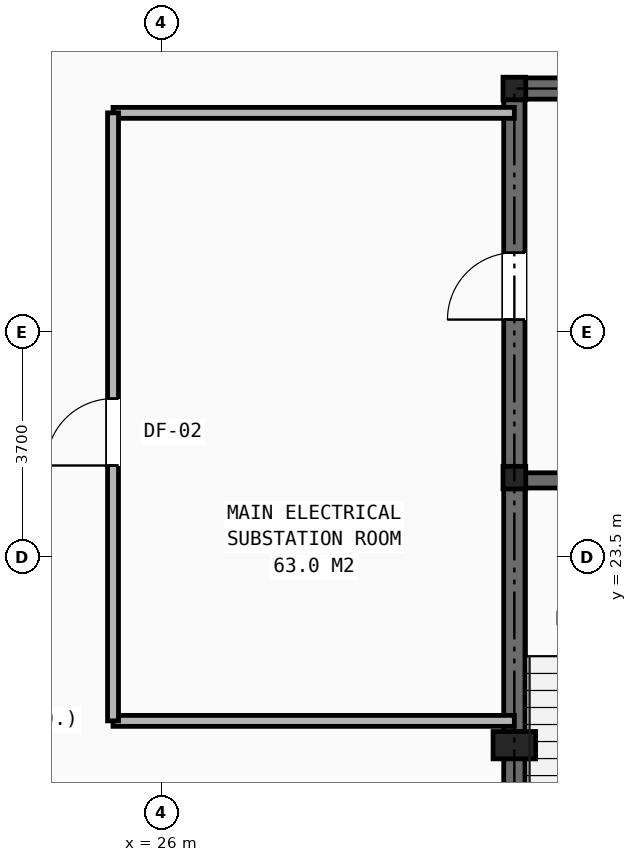
"""IFC4 building model, lengths in metres.
Left out: names, types, materials, properties, quantities, classifications, styles, units other than length and angle.
Written with IfcOpenShell. Run it as: python <this file> out.ifc"""

import sys

from ifc_helpers import new_model, si_unit, direction, frame, frame_2d, origin, origin_2d, place, context, subcontext, project, spatial, rectangle, i_section, extrude, element, fill, save


model = new_model("IFC4")
c1 = context("Model", 3, precision=1e-05, world=origin(), true_north=direction((0.0, 1.0)))
c2 = subcontext(c1, "Body", "Model", "MODEL_VIEW")
j1 = project(units=[si_unit("LENGTHUNIT", "METRE"), si_unit("PLANEANGLEUNIT", "RADIAN")], contexts=[c1])
p1 = place(None, origin())
s1 = spatial("IfcSite", under=j1, at=p1, CompositionType="ELEMENT")
p2 = place(p1, origin())
s2 = spatial("IfcBuilding", under=s1, at=p2, CompositionType="ELEMENT")
p3 = place(p2, frame((0.0, 0.0, -10.0)))
s3 = spatial("IfcBuildingStorey", under=s2, at=p3, CompositionType="ELEMENT", Elevation=-10.0)
for number, where, z_axis, x_axis in (
    (1, (31.8, 24.8, 0.0), (0.0, 0.0, 1.0), (1.0, 0.0, 0.0)),
    (2, (31.8, 31.2, 0.0), (0.0, 0.0, 1.0), (1.0, 0.0, 0.0)),
):
    element("IfcColumn", number, at=place(p3, frame(where, z_axis=z_axis, x_axis=x_axis)), inside=s3, PredefinedType="COLUMN", context=c2, shape_type="SweptSolid", body=[
        extrude(i_section(OverallWidth=0.374, OverallDepth=0.372, WebThickness=0.016, FlangeThickness=0.026, at=origin_2d()), origin(), (0.0, 0.0, 1.0), 5.0),
    ])
p4 = place(p3, frame((31.8, 20.4, 0.0), z_axis=(0.0, 0.0, 1.0), x_axis=(1.0, 0.0, 0.0)))
e3 = element("IfcColumn", 3, at=p4, inside=s3, PredefinedType="PILASTER", context=c2, shape_type="SweptSolid", body=[
    extrude(rectangle(XDim=0.7, YDim=0.45, at=origin_2d()), origin(), (0.0, 0.0, 1.0), 5.0),
])
p5 = place(p3, frame((31.8, 31.2, 0.0), z_axis=(0.0, 0.0, 1.0), x_axis=(1.0, 0.0, 0.0)))
e4 = element("IfcWall", 4, at=p5, inside=s3, PredefinedType="SHEAR", context=c2, shape_type="SweptSolid", body=[
    extrude(rectangle(XDim=16.4, YDim=0.35, at=frame_2d((8.2, 0.0))), origin(), (0.0, 0.0, 1.0), 4.64),
])
p6 = place(p3, frame((31.8, 16.4, 0.0), z_axis=(0.0, 0.0, 1.0), x_axis=(0.0, 1.0, 0.0)))
e5 = element("IfcWall", 5, at=p6, inside=s3, PredefinedType="SHEAR", context=c2, shape_type="SweptSolid", body=[
    extrude(rectangle(XDim=14.8, YDim=0.35, at=frame_2d((7.4, 0.0))), origin(), (0.0, 0.0, 1.0), 4.64),
])
p7 = place(p6, frame((11.0, 0.0, 0.0)))
e6 = element("IfcOpeningElement", 6, at=p7, cuts=e5, PredefinedType="OPENING", context=c2, shape_type="SweptSolid", body=[
    extrude(rectangle(XDim=1.1, YDim=2.15, at=frame_2d((0.55, 1.075))), frame((0.0, 0.185, 0.0), z_axis=(0.0, -1.0, 0.0), x_axis=(1.0, 0.0, 0.0)), (0.0, 0.0, 1.0), 0.37),
])
p8 = place(p3, frame((31.8, 24.755, 0.0), z_axis=(0.0, 0.0, 1.0), x_axis=(1.0, 0.0, 0.0)))
e7 = element("IfcWall", 7, at=p8, inside=s3, PredefinedType="SHEAR", context=c2, shape_type="SweptSolid", body=[
    extrude(rectangle(XDim=3.245, YDim=0.25, at=frame_2d((1.623, 0.0))), origin(), (0.0, 0.0, 1.0), 4.64),
])
p9 = place(p3, frame((25.2, 20.8, 0.0), z_axis=(0.0, 0.0, 1.0), x_axis=(1.0, 0.0, 0.0)))
e8 = element("IfcWall", 8, at=p9, inside=s3, PredefinedType="PARTITIONING", context=c2, shape_type="SweptSolid", body=[
    extrude(rectangle(XDim=6.6, YDim=0.18, at=frame_2d((3.3, 0.0))), origin(), (0.0, 0.0, 1.0), 4.64),
])
p10 = place(p3, frame((25.2, 30.8, 0.0), z_axis=(0.0, 0.0, 1.0), x_axis=(1.0, 0.0, 0.0)))
e9 = element("IfcWall", 9, at=p10, inside=s3, PredefinedType="PARTITIONING", context=c2, shape_type="SweptSolid", body=[
    extrude(rectangle(XDim=6.6, YDim=0.18, at=frame_2d((3.3, 0.0))), origin(), (0.0, 0.0, 1.0), 3.78),
])
p11 = place(p3, frame((25.2, 20.8, 0.0), z_axis=(0.0, 0.0, 1.0), x_axis=(0.0, 1.0, 0.0)))
e10 = element("IfcWall", 10, at=p11, inside=s3, PredefinedType="PARTITIONING", context=c2, shape_type="SweptSolid", body=[
    extrude(rectangle(XDim=10.0, YDim=0.18, at=frame_2d((5.0, 0.0))), origin(), (0.0, 0.0, 1.0), 4.64),
])
p12 = place(p11, frame((4.2, 0.0, 0.0)))
e11 = element("IfcOpeningElement", 11, at=p12, cuts=e10, PredefinedType="OPENING", context=c2, shape_type="SweptSolid", body=[
    extrude(rectangle(XDim=1.1, YDim=2.15, at=frame_2d((0.55, 1.075))), frame((0.0, 0.1, 0.0), z_axis=(0.0, -1.0, 0.0), x_axis=(1.0, 0.0, 0.0)), (0.0, 0.0, 1.0), 0.2),
])
p13 = place(p7, origin())
e12 = element("IfcDoor", 12, at=p13, inside=s3, OperationType="SINGLE_SWING_LEFT", PredefinedType="DOOR", context=c2, shape_type="SweptSolid", body=[
    extrude(rectangle(XDim=1.1, YDim=2.15, at=frame_2d((0.55, 1.075))), frame((0.0, 0.025, 0.0), z_axis=(0.0, -1.0, 0.0), x_axis=(1.0, 0.0, 0.0)), (0.0, 0.0, 1.0), 0.05),
])
fill(e6, e12)
p14 = place(p12, origin())
e13 = element("IfcDoor", 13, at=p14, inside=s3, OperationType="SINGLE_SWING_LEFT", PredefinedType="DOOR", context=c2, shape_type="SweptSolid", body=[
    extrude(rectangle(XDim=1.1, YDim=2.15, at=frame_2d((0.55, 1.075))), frame((0.0, 0.025, 0.0), z_axis=(0.0, -1.0, 0.0), x_axis=(1.0, 0.0, 0.0)), (0.0, 0.0, 1.0), 0.05),
])
fill(e11, e13)
save(model, sys.argv[1])
